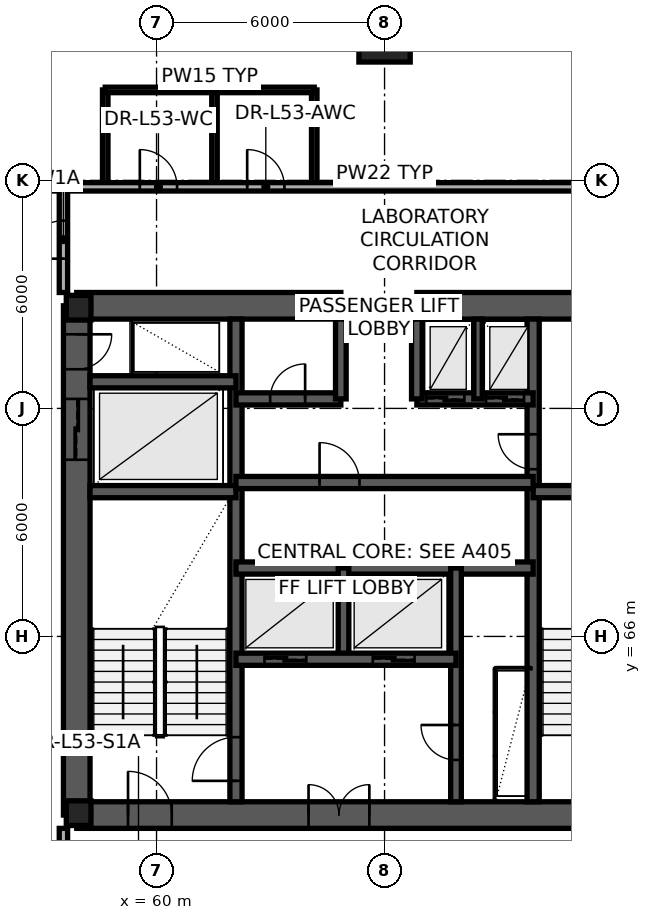
"""IFC4 building model, lengths in metres.
Left out: names, types, materials, properties, quantities, classifications, styles, units other than length and angle.
Written with IfcOpenShell. Run it as: python <this file> out.ifc"""

import sys

from ifc_helpers import new_model, si_unit, direction, frame, frame_2d, origin, origin_2d, place, context, subcontext, project, spatial, rectangle, extrude, element, fill, save


model = new_model("IFC4")
c1 = context("Model", 3, precision=1e-05, world=origin(), true_north=direction((0.0, 1.0)))
c2 = subcontext(c1, "Body", "Model", "MODEL_VIEW")
j1 = project(units=[si_unit("LENGTHUNIT", "METRE"), si_unit("PLANEANGLEUNIT", "RADIAN")], contexts=[c1])
p1 = place(None, origin())
s1 = spatial("IfcSite", under=j1, at=p1, CompositionType="ELEMENT")
p2 = place(p1, origin())
s2 = spatial("IfcBuilding", under=s1, at=p2, CompositionType="ELEMENT")
p3 = place(p2, frame((0.0, 0.0, 201.3)))
s3 = spatial("IfcBuildingStorey", under=s2, at=p3, CompositionType="ELEMENT", Elevation=201.3)
p4 = place(p3, frame((57.9, 61.3, 0.0), z_axis=(0.0, 0.0, 1.0), x_axis=(1.0, 0.0, 0.0)))
e1 = element("IfcWall", 1, at=p4, inside=s3, PredefinedType="SHEAR", context=c2, shape_type="SweptSolid", body=[
    extrude(rectangle(XDim=16.2, YDim=0.7, at=frame_2d((8.1, 0.0))), origin(), (0.0, 0.0, 1.0), 3.65),
])
p5 = place(p4, frame((1.35, 0.0, 0.0)))
e2 = element("IfcOpeningElement", 2, at=p5, cuts=e1, PredefinedType="OPENING", context=c2, shape_type="SweptSolid", body=[
    extrude(rectangle(XDim=1.15, YDim=2.15, at=frame_2d((0.575, 1.075))), frame((0.0, 0.36, 0.0), z_axis=(0.0, -1.0, 0.0), x_axis=(1.0, 0.0, 0.0)), (0.0, 0.0, 1.0), 0.72),
])
p6 = place(p4, frame((6.1, 0.0, 0.0)))
e3 = element("IfcOpeningElement", 3, at=p6, cuts=e1, PredefinedType="OPENING", context=c2, shape_type="SweptSolid", body=[
    extrude(rectangle(XDim=1.6, YDim=2.15, at=frame_2d((0.8, 1.075))), frame((0.0, 0.36, 0.0), z_axis=(0.0, -1.0, 0.0), x_axis=(1.0, 0.0, 0.0)), (0.0, 0.0, 1.0), 0.72),
])
p7 = place(p4, frame((13.55, 0.0, 0.0)))
e4 = element("IfcOpeningElement", 4, at=p7, cuts=e1, PredefinedType="OPENING", context=c2, shape_type="SweptSolid", body=[
    extrude(rectangle(XDim=1.15, YDim=2.15, at=frame_2d((0.575, 1.075))), frame((0.0, 0.36, 0.0), z_axis=(0.0, -1.0, 0.0), x_axis=(1.0, 0.0, 0.0)), (0.0, 0.0, 1.0), 0.72),
])
p8 = place(p3, frame((74.1, 74.7, 0.0), z_axis=(0.0, 0.0, 1.0), x_axis=(-1.0, 0.0, 0.0)))
e5 = element("IfcWall", 5, at=p8, inside=s3, PredefinedType="SHEAR", context=c2, shape_type="SweptSolid", body=[
    extrude(rectangle(XDim=7.25, YDim=0.7, at=frame_2d((3.625, 0.0))), origin(), (0.0, 0.0, 1.0), 3.65),
])
p9 = place(p3, frame((64.85, 74.7, 0.0), z_axis=(0.0, 0.0, 1.0), x_axis=(-1.0, 0.0, 0.0)))
e6 = element("IfcWall", 6, at=p9, inside=s3, PredefinedType="SHEAR", context=c2, shape_type="SweptSolid", body=[
    extrude(rectangle(XDim=6.95, YDim=0.7, at=frame_2d((3.475, 0.0))), origin(), (0.0, 0.0, 1.0), 3.65),
])
p10 = place(p3, frame((57.9, 74.7, 0.0), z_axis=(0.0, 0.0, 1.0), x_axis=(0.0, -1.0, 0.0)))
e7 = element("IfcWall", 7, at=p10, inside=s3, PredefinedType="SHEAR", context=c2, shape_type="SweptSolid", body=[
    extrude(rectangle(XDim=13.4, YDim=0.7, at=frame_2d((6.7, 0.0))), origin(), (0.0, 0.0, 1.0), 3.65),
])
p11 = place(p10, frame((0.75, 0.0, 0.0)))
e8 = element("IfcOpeningElement", 8, at=p11, cuts=e7, PredefinedType="OPENING", context=c2, shape_type="SweptSolid", body=[
    extrude(rectangle(XDim=0.92, YDim=2.05, at=frame_2d((0.46, 1.025))), frame((0.0, 0.36, 0.0), z_axis=(0.0, -1.0, 0.0), x_axis=(1.0, 0.0, 0.0)), (0.0, 0.0, 1.0), 0.72),
])
p12 = place(p10, frame((2.45, 0.0, 0.0)))
e9 = element("IfcOpeningElement", 9, at=p12, cuts=e7, PredefinedType="OPENING", context=c2, shape_type="SweptSolid", body=[
    extrude(rectangle(XDim=1.6, YDim=2.3, at=frame_2d((0.8, 1.15))), frame((0.0, 0.36, 0.0), z_axis=(0.0, -1.0, 0.0), x_axis=(1.0, 0.0, 0.0)), (0.0, 0.0, 1.0), 0.72),
])
p13 = place(p3, frame((62.09, 61.65, 0.0), z_axis=(0.0, 0.0, 1.0), x_axis=(0.0, 1.0, 0.0)))
e10 = element("IfcWall", 10, at=p13, inside=s3, PredefinedType="SHEAR", context=c2, shape_type="SweptSolid", body=[
    extrude(rectangle(XDim=12.7, YDim=0.32, at=frame_2d((6.35, 0.0))), origin(), (0.0, 0.0, 1.0), 3.65),
])
p14 = place(p13, frame((0.55, 0.0, 0.0)))
e11 = element("IfcOpeningElement", 11, at=p14, cuts=e10, PredefinedType="OPENING", context=c2, shape_type="SweptSolid", body=[
    extrude(rectangle(XDim=1.15, YDim=2.15, at=frame_2d((0.575, 1.075))), frame((0.0, 0.17, 0.0), z_axis=(0.0, -1.0, 0.0), x_axis=(1.0, 0.0, 0.0)), (0.0, 0.0, 1.0), 0.34),
])
p15 = place(p3, frame((69.91, 61.65, 0.0), z_axis=(0.0, 0.0, 1.0), x_axis=(0.0, 1.0, 0.0)))
e12 = element("IfcWall", 12, at=p15, inside=s3, PredefinedType="SHEAR", context=c2, shape_type="SweptSolid", body=[
    extrude(rectangle(XDim=12.7, YDim=0.32, at=frame_2d((6.35, 0.0))), origin(), (0.0, 0.0, 1.0), 3.65),
])
p16 = place(p15, frame((8.75, 0.0, 0.0)))
e13 = element("IfcOpeningElement", 13, at=p16, cuts=e12, PredefinedType="OPENING", context=c2, shape_type="SweptSolid", body=[
    extrude(rectangle(XDim=0.92, YDim=2.05, at=frame_2d((0.46, 1.025))), frame((0.0, 0.17, 0.0), z_axis=(0.0, -1.0, 0.0), x_axis=(1.0, 0.0, 0.0)), (0.0, 0.0, 1.0), 0.34),
])
for number, where, z_axis, x_axis in (
    (14, (58.25, 69.81, 0.0), (0.0, 0.0, 1.0), (1.0, 0.0, 0.0)),
    (15, (69.91, 69.81, 0.0), (0.0, 0.0, 1.0), (1.0, 0.0, 0.0)),
    (16, (58.25, 72.7, 0.0), (0.0, 0.0, 1.0), (1.0, 0.0, 0.0)),
):
    element("IfcWall", number, at=place(p3, frame(where, z_axis=z_axis, x_axis=x_axis)), inside=s3, PredefinedType="SHEAR", context=c2, shape_type="SweptSolid", body=[
        extrude(rectangle(XDim=3.84, YDim=0.32, at=frame_2d((1.92, 0.0))), origin(), (0.0, 0.0, 1.0), 3.65),
    ])
p17 = place(p3, frame((62.09, 67.8, 0.0), z_axis=(0.0, 0.0, 1.0), x_axis=(1.0, 0.0, 0.0)))
e17 = element("IfcWall", 17, at=p17, inside=s3, PredefinedType="SHEAR", context=c2, shape_type="SweptSolid", body=[
    extrude(rectangle(XDim=7.82, YDim=0.32, at=frame_2d((3.91, 0.0))), origin(), (0.0, 0.0, 1.0), 3.65),
])
p18 = place(p3, frame((64.92, 65.4, 0.0), z_axis=(0.0, 0.0, 1.0), x_axis=(0.0, 1.0, 0.0)))
e18 = element("IfcWall", 18, at=p18, inside=s3, PredefinedType="SHEAR", context=c2, shape_type="SweptSolid", body=[
    extrude(rectangle(XDim=2.4, YDim=0.28, at=frame_2d((1.2, 0.0))), origin(), (0.0, 0.0, 1.0), 3.65),
])
p19 = place(p3, frame((62.09, 70.05, 0.0), z_axis=(0.0, 0.0, 1.0), x_axis=(1.0, 0.0, 0.0)))
e19 = element("IfcWall", 19, at=p19, inside=s3, PredefinedType="SHEAR", context=c2, shape_type="SweptSolid", body=[
    extrude(rectangle(XDim=7.82, YDim=0.32, at=frame_2d((3.91, 0.0))), origin(), (0.0, 0.0, 1.0), 3.65),
])
p20 = place(p19, frame((2.2, 0.0, 0.0)))
e20 = element("IfcOpeningElement", 20, at=p20, cuts=e19, PredefinedType="OPENING", context=c2, shape_type="SweptSolid", body=[
    extrude(rectangle(XDim=1.05, YDim=2.15, at=frame_2d((0.525, 1.075))), frame((0.0, 0.17, 0.0), z_axis=(0.0, -1.0, 0.0), x_axis=(1.0, 0.0, 0.0)), (0.0, 0.0, 1.0), 0.34),
])
p21 = place(p3, frame((62.09, 72.25, 0.0), z_axis=(0.0, 0.0, 1.0), x_axis=(1.0, 0.0, 0.0)))
e21 = element("IfcWall", 21, at=p21, inside=s3, PredefinedType="SHEAR", context=c2, shape_type="SweptSolid", body=[
    extrude(rectangle(XDim=2.76, YDim=0.32, at=frame_2d((1.38, 0.0))), origin(), (0.0, 0.0, 1.0), 3.65),
])
p22 = place(p21, frame((0.9, 0.0, 0.0)))
e22 = element("IfcOpeningElement", 22, at=p22, cuts=e21, PredefinedType="OPENING", context=c2, shape_type="SweptSolid", body=[
    extrude(rectangle(XDim=0.92, YDim=2.05, at=frame_2d((0.46, 1.025))), frame((0.0, 0.17, 0.0), z_axis=(0.0, -1.0, 0.0), x_axis=(1.0, 0.0, 0.0)), (0.0, 0.0, 1.0), 0.34),
])
p23 = place(p3, frame((66.85, 72.25, 0.0), z_axis=(0.0, 0.0, 1.0), x_axis=(1.0, 0.0, 0.0)))
e23 = element("IfcWall", 23, at=p23, inside=s3, PredefinedType="SHEAR", context=c2, shape_type="SweptSolid", body=[
    extrude(rectangle(XDim=3.06, YDim=0.32, at=frame_2d((1.53, 0.0))), origin(), (0.0, 0.0, 1.0), 3.65),
])
p24 = place(p23, frame((0.25, 0.0, 0.0)))
e24 = element("IfcOpeningElement", 24, at=p24, cuts=e23, PredefinedType="OPENING", context=c2, shape_type="SweptSolid", body=[
    extrude(rectangle(XDim=1.0, YDim=2.2, at=frame_2d((0.5, 1.1))), frame((0.0, 0.17, 0.0), z_axis=(0.0, -1.0, 0.0), x_axis=(1.0, 0.0, 0.0)), (0.0, 0.0, 1.0), 0.34),
])
p25 = place(p23, frame((1.82, 0.0, 0.0)))
e25 = element("IfcOpeningElement", 25, at=p25, cuts=e23, PredefinedType="OPENING", context=c2, shape_type="SweptSolid", body=[
    extrude(rectangle(XDim=1.0, YDim=2.2, at=frame_2d((0.5, 1.1))), frame((0.0, 0.17, 0.0), z_axis=(0.0, -1.0, 0.0), x_axis=(1.0, 0.0, 0.0)), (0.0, 0.0, 1.0), 0.34),
])
for number, where, z_axis, x_axis in (
    (26, (64.85, 72.25, 0.0), (0.0, 0.0, 1.0), (0.0, 1.0, 0.0)),
    (27, (66.85, 72.25, 0.0), (0.0, 0.0, 1.0), (0.0, 1.0, 0.0)),
):
    element("IfcWall", number, at=place(p3, frame(where, z_axis=z_axis, x_axis=x_axis)), inside=s3, PredefinedType="SHEAR", context=c2, shape_type="SweptSolid", body=[
        extrude(rectangle(XDim=2.1, YDim=0.28, at=frame_2d((1.05, 0.0))), origin(), (0.0, 0.0, 1.0), 3.65),
    ])
p26 = place(p3, frame((68.46, 72.25, 0.0), z_axis=(0.0, 0.0, 1.0), x_axis=(0.0, 1.0, 0.0)))
e28 = element("IfcWall", 28, at=p26, inside=s3, PredefinedType="SHEAR", context=c2, shape_type="SweptSolid", body=[
    extrude(rectangle(XDim=2.1, YDim=0.22, at=frame_2d((1.05, 0.0))), origin(), (0.0, 0.0, 1.0), 3.65),
])
p27 = place(p3, frame((67.88, 61.65, 0.0), z_axis=(0.0, 0.0, 1.0), x_axis=(0.0, 1.0, 0.0)))
e29 = element("IfcWall", 29, at=p27, inside=s3, PredefinedType="SHEAR", context=c2, shape_type="SweptSolid", body=[
    extrude(rectangle(XDim=6.15, YDim=0.28, at=frame_2d((3.075, 0.0))), origin(), (0.0, 0.0, 1.0), 3.65),
])
p28 = place(p27, frame((1.1, 0.0, 0.0)))
e30 = element("IfcOpeningElement", 30, at=p28, cuts=e29, PredefinedType="OPENING", context=c2, shape_type="SweptSolid", body=[
    extrude(rectangle(XDim=0.92, YDim=2.05, at=frame_2d((0.46, 1.025))), frame((0.0, 0.15, 0.0), z_axis=(0.0, -1.0, 0.0), x_axis=(1.0, 0.0, 0.0)), (0.0, 0.0, 1.0), 0.3),
])
p29 = place(p3, frame((62.09, 65.4, 0.0), z_axis=(0.0, 0.0, 1.0), x_axis=(1.0, 0.0, 0.0)))
e31 = element("IfcWall", 31, at=p29, inside=s3, PredefinedType="SHEAR", context=c2, shape_type="SweptSolid", body=[
    extrude(rectangle(XDim=5.79, YDim=0.32, at=frame_2d((2.895, 0.0))), origin(), (0.0, 0.0, 1.0), 3.65),
])
p30 = place(p29, frame((0.75, 0.0, 0.0)))
e32 = element("IfcOpeningElement", 32, at=p30, cuts=e31, PredefinedType="OPENING", context=c2, shape_type="SweptSolid", body=[
    extrude(rectangle(XDim=1.1, YDim=2.2, at=frame_2d((0.55, 1.1))), frame((0.0, 0.17, 0.0), z_axis=(0.0, -1.0, 0.0), x_axis=(1.0, 0.0, 0.0)), (0.0, 0.0, 1.0), 0.34),
])
p31 = place(p29, frame((3.6, 0.0, 0.0)))
e33 = element("IfcOpeningElement", 33, at=p31, cuts=e31, PredefinedType="OPENING", context=c2, shape_type="SweptSolid", body=[
    extrude(rectangle(XDim=1.1, YDim=2.2, at=frame_2d((0.55, 1.1))), frame((0.0, 0.17, 0.0), z_axis=(0.0, -1.0, 0.0), x_axis=(1.0, 0.0, 0.0)), (0.0, 0.0, 1.0), 0.34),
])
for number, where, z_axis, x_axis in (
    (34, (57.95, 61.35, 0.0), (0.0, 0.0, 1.0), (1.0, 0.0, 0.0)),
    (35, (57.95, 74.65, 0.0), (0.0, 0.0, 1.0), (1.0, 0.0, 0.0)),
):
    element("IfcColumn", number, at=place(p3, frame(where, z_axis=z_axis, x_axis=x_axis)), inside=s3, PredefinedType="COLUMN", context=c2, shape_type="SweptSolid", body=[
        extrude(rectangle(XDim=0.65, YDim=0.65, at=origin_2d()), origin(), (0.0, 0.0, 1.0), 3.65),
    ])
p32 = place(p3, frame((66.0, 81.789, 0.0), z_axis=(0.0, 0.0, 1.0), x_axis=(1.0, 0.0, 0.0)))
e36 = element("IfcColumn", 36, at=p32, inside=s3, PredefinedType="COLUMN", context=c2, shape_type="SweptSolid", body=[
    extrude(rectangle(XDim=1.35, YDim=1.35, at=origin_2d()), origin(), (0.0, 0.0, 1.0), 3.65),
])
p33 = place(p3, frame((61.231, 32.098, 0.0), z_axis=(0.0, 0.0, 1.0), x_axis=(-0.398627130257, 0.917113085188, 0.0)))
e37 = element("IfcWall", 37, at=p33, inside=s3, PredefinedType="STANDARD", context=c2, shape_type="SweptSolid", body=[
    extrude(rectangle(XDim=51.591, YDim=0.34, at=frame_2d((25.795, 0.0))), origin(), (0.0, 0.0, 1.0), 0.85),
])
p34 = place(p3, frame((58.65, 77.83, 0.0), z_axis=(0.0, 0.0, 1.0), x_axis=(0.0, 1.0, 0.0)))
e38 = element("IfcWall", 38, at=p34, inside=s3, PredefinedType="PARTITIONING", context=c2, shape_type="SweptSolid", body=[
    extrude(rectangle(XDim=2.55, YDim=0.145, at=frame_2d((1.275, 0.0))), origin(), (0.0, 0.0, 1.0), 2.78),
])
for number, where, z_axis, x_axis in (
    (39, (61.525, 77.83, 0.0), (0.0, 0.0, 1.0), (0.0, 1.0, 0.0)),
    (40, (64.15, 77.83, 0.0), (0.0, 0.0, 1.0), (0.0, 1.0, 0.0)),
):
    element("IfcWall", number, at=place(p3, frame(where, z_axis=z_axis, x_axis=x_axis)), inside=s3, PredefinedType="PARTITIONING", context=c2, shape_type="SweptSolid", body=[
        extrude(rectangle(XDim=2.55, YDim=0.145, at=frame_2d((1.275, 0.0))), origin(), (0.0, 0.0, 1.0), 3.4),
    ])
p35 = place(p3, frame((58.65, 80.38, 0.0), z_axis=(0.0, 0.0, 1.0), x_axis=(1.0, 0.0, 0.0)))
e41 = element("IfcWall", 41, at=p35, inside=s3, PredefinedType="PARTITIONING", context=c2, shape_type="SweptSolid", body=[
    extrude(rectangle(XDim=5.5, YDim=0.145, at=frame_2d((2.75, 0.0))), origin(), (0.0, 0.0, 1.0), 2.78),
])
p36 = place(p3, frame((41.446, 77.83, 0.0), z_axis=(0.0, 0.0, 1.0), x_axis=(1.0, 0.0, 0.0)))
e42 = element("IfcWall", 42, at=p36, inside=s3, PredefinedType="PARTITIONING", context=c2, shape_type="SweptSolid", body=[
    extrude(rectangle(XDim=49.108, YDim=0.22, at=frame_2d((24.554, 0.0))), origin(), (0.0, 0.0, 1.0), 2.6),
])
p37 = place(p36, frame((18.114, 0.0, 0.0)))
e43 = element("IfcOpeningElement", 43, at=p37, cuts=e42, PredefinedType="OPENING", context=c2, shape_type="SweptSolid", body=[
    extrude(rectangle(XDim=0.98, YDim=2.1, at=frame_2d((0.49, 1.05))), frame((0.0, 0.12, 0.0), z_axis=(0.0, -1.0, 0.0), x_axis=(1.0, 0.0, 0.0)), (0.0, 0.0, 1.0), 0.24),
])
p38 = place(p36, frame((20.939, 0.0, 0.0)))
e44 = element("IfcOpeningElement", 44, at=p38, cuts=e42, PredefinedType="OPENING", context=c2, shape_type="SweptSolid", body=[
    extrude(rectangle(XDim=0.98, YDim=2.1, at=frame_2d((0.49, 1.05))), frame((0.0, 0.12, 0.0), z_axis=(0.0, -1.0, 0.0), x_axis=(1.0, 0.0, 0.0)), (0.0, 0.0, 1.0), 0.24),
])
p39 = place(p36, frame((31.676, 0.0, 0.0)))
e45 = element("IfcOpeningElement", 45, at=p39, cuts=e42, PredefinedType="OPENING", context=c2, shape_type="SweptSolid", body=[
    extrude(rectangle(XDim=1.0, YDim=2.1, at=frame_2d((0.5, 1.05))), frame((0.0, 0.12, 0.0), z_axis=(0.0, -1.0, 0.0), x_axis=(1.0, 0.0, 0.0)), (0.0, 0.0, 1.0), 0.24),
])
p40 = place(p3, frame((57.55, 75.05, 0.0), z_axis=(0.0, 0.0, 1.0), x_axis=(0.0, 1.0, 0.0)))
e46 = element("IfcWall", 46, at=p40, inside=s3, PredefinedType="PARTITIONING", context=c2, shape_type="SweptSolid", body=[
    extrude(rectangle(XDim=2.78, YDim=0.22, at=frame_2d((1.39, 0.0))), origin(), (0.0, 0.0, 1.0), 2.78),
])
p41 = place(p40, frame((0.89, 0.0, 0.0)))
e47 = element("IfcOpeningElement", 47, at=p41, cuts=e46, PredefinedType="OPENING", context=c2, shape_type="SweptSolid", body=[
    extrude(rectangle(XDim=1.0, YDim=2.1, at=frame_2d((0.5, 1.05))), frame((0.0, 0.12, 0.0), z_axis=(0.0, -1.0, 0.0), x_axis=(1.0, 0.0, 0.0)), (0.0, 0.0, 1.0), 0.24),
])
p42 = place(p3, frame((57.55, 59.53, 0.0), z_axis=(0.0, 0.0, 1.0), x_axis=(0.0, 1.0, 0.0)))
e48 = element("IfcWall", 48, at=p42, inside=s3, PredefinedType="PARTITIONING", context=c2, shape_type="SweptSolid", body=[
    extrude(rectangle(XDim=1.42, YDim=0.22, at=frame_2d((0.71, 0.0))), origin(), (0.0, 0.0, 1.0), 2.78),
])
p43 = place(p14, origin())
e49 = element("IfcDoor", 49, at=p43, inside=s3, OperationType="SINGLE_SWING_LEFT", PredefinedType="DOOR", context=c2, shape_type="SweptSolid", body=[
    extrude(rectangle(XDim=1.15, YDim=2.15, at=frame_2d((0.575, 1.075))), frame((0.0, 0.025, 0.0), z_axis=(0.0, -1.0, 0.0), x_axis=(1.0, 0.0, 0.0)), (0.0, 0.0, 1.0), 0.05),
])
fill(e11, e49)
p44 = place(p28, origin())
e50 = element("IfcDoor", 50, at=p44, inside=s3, OperationType="SINGLE_SWING_RIGHT", PredefinedType="DOOR", context=c2, shape_type="SweptSolid", body=[
    extrude(rectangle(XDim=0.92, YDim=2.05, at=frame_2d((0.46, 1.025))), frame((0.0, 0.025, 0.0), z_axis=(0.0, -1.0, 0.0), x_axis=(1.0, 0.0, 0.0)), (0.0, 0.0, 1.0), 0.05),
])
fill(e30, e50)
p45 = place(p30, origin())
e51 = element("IfcDoor", 51, at=p45, inside=s3, OperationType="SLIDING_TO_LEFT", PredefinedType="DOOR", context=c2, shape_type="SweptSolid", body=[
    extrude(rectangle(XDim=1.1, YDim=2.2, at=frame_2d((0.55, 1.1))), frame((0.0, 0.025, 0.0), z_axis=(0.0, -1.0, 0.0), x_axis=(1.0, 0.0, 0.0)), (0.0, 0.0, 1.0), 0.05),
])
fill(e32, e51)
p46 = place(p31, origin())
e52 = element("IfcDoor", 52, at=p46, inside=s3, OperationType="SLIDING_TO_LEFT", PredefinedType="DOOR", context=c2, shape_type="SweptSolid", body=[
    extrude(rectangle(XDim=1.1, YDim=2.2, at=frame_2d((0.55, 1.1))), frame((0.0, 0.025, 0.0), z_axis=(0.0, -1.0, 0.0), x_axis=(1.0, 0.0, 0.0)), (0.0, 0.0, 1.0), 0.05),
])
fill(e33, e52)
p47 = place(p20, origin())
e53 = element("IfcDoor", 53, at=p47, inside=s3, OperationType="SINGLE_SWING_LEFT", PredefinedType="DOOR", context=c2, shape_type="SweptSolid", body=[
    extrude(rectangle(XDim=1.05, YDim=2.15, at=frame_2d((0.525, 1.075))), frame((0.0, 0.025, 0.0), z_axis=(0.0, -1.0, 0.0), x_axis=(1.0, 0.0, 0.0)), (0.0, 0.0, 1.0), 0.05),
])
fill(e20, e53)
p48 = place(p22, origin())
e54 = element("IfcDoor", 54, at=p48, inside=s3, OperationType="SINGLE_SWING_RIGHT", PredefinedType="DOOR", context=c2, shape_type="SweptSolid", body=[
    extrude(rectangle(XDim=0.92, YDim=2.05, at=frame_2d((0.46, 1.025))), frame((0.0, 0.025, 0.0), z_axis=(0.0, -1.0, 0.0), x_axis=(1.0, 0.0, 0.0)), (0.0, 0.0, 1.0), 0.05),
])
fill(e22, e54)
p49 = place(p24, origin())
e55 = element("IfcDoor", 55, at=p49, inside=s3, OperationType="SLIDING_TO_LEFT", PredefinedType="DOOR", context=c2, shape_type="SweptSolid", body=[
    extrude(rectangle(XDim=1.0, YDim=2.2, at=frame_2d((0.5, 1.1))), frame((0.0, 0.025, 0.0), z_axis=(0.0, -1.0, 0.0), x_axis=(1.0, 0.0, 0.0)), (0.0, 0.0, 1.0), 0.05),
])
fill(e24, e55)
p50 = place(p25, origin())
e56 = element("IfcDoor", 56, at=p50, inside=s3, OperationType="SLIDING_TO_LEFT", PredefinedType="DOOR", context=c2, shape_type="SweptSolid", body=[
    extrude(rectangle(XDim=1.0, YDim=2.2, at=frame_2d((0.5, 1.1))), frame((0.0, 0.025, 0.0), z_axis=(0.0, -1.0, 0.0), x_axis=(1.0, 0.0, 0.0)), (0.0, 0.0, 1.0), 0.05),
])
fill(e25, e56)
p51 = place(p5, origin())
e57 = element("IfcDoor", 57, at=p51, inside=s3, OperationType="SINGLE_SWING_LEFT", PredefinedType="DOOR", context=c2, shape_type="SweptSolid", body=[
    extrude(rectangle(XDim=1.15, YDim=2.15, at=frame_2d((0.575, 1.075))), frame((0.0, 0.025, 0.0), z_axis=(0.0, -1.0, 0.0), x_axis=(1.0, 0.0, 0.0)), (0.0, 0.0, 1.0), 0.05),
])
fill(e2, e57)
p52 = place(p6, origin())
e58 = element("IfcDoor", 58, at=p52, inside=s3, OperationType="DOUBLE_DOOR_SINGLE_SWING", PredefinedType="DOOR", context=c2, shape_type="SweptSolid", body=[
    extrude(rectangle(XDim=1.6, YDim=2.15, at=frame_2d((0.8, 1.075))), frame((0.0, 0.025, 0.0), z_axis=(0.0, -1.0, 0.0), x_axis=(1.0, 0.0, 0.0)), (0.0, 0.0, 1.0), 0.05),
])
fill(e3, e58)
p53 = place(p11, origin())
e59 = element("IfcDoor", 59, at=p53, inside=s3, OperationType="SINGLE_SWING_LEFT", PredefinedType="DOOR", context=c2, shape_type="SweptSolid", body=[
    extrude(rectangle(XDim=0.92, YDim=2.05, at=frame_2d((0.46, 1.025))), frame((0.0, 0.025, 0.0), z_axis=(0.0, -1.0, 0.0), x_axis=(1.0, 0.0, 0.0)), (0.0, 0.0, 1.0), 0.05),
])
fill(e8, e59)
p54 = place(p12, origin())
e60 = element("IfcDoor", 60, at=p54, inside=s3, OperationType="DOUBLE_DOOR_SLIDING", PredefinedType="DOOR", context=c2, shape_type="SweptSolid", body=[
    extrude(rectangle(XDim=1.6, YDim=2.3, at=frame_2d((0.8, 1.15))), frame((0.0, 0.025, 0.0), z_axis=(0.0, -1.0, 0.0), x_axis=(1.0, 0.0, 0.0)), (0.0, 0.0, 1.0), 0.05),
])
fill(e9, e60)
p55 = place(p16, origin())
e61 = element("IfcDoor", 61, at=p55, inside=s3, OperationType="SINGLE_SWING_RIGHT", PredefinedType="DOOR", context=c2, shape_type="SweptSolid", body=[
    extrude(rectangle(XDim=0.92, YDim=2.05, at=frame_2d((0.46, 1.025))), frame((0.0, 0.025, 0.0), z_axis=(0.0, -1.0, 0.0), x_axis=(1.0, 0.0, 0.0)), (0.0, 0.0, 1.0), 0.05),
])
fill(e13, e61)
p56 = place(p37, origin())
e62 = element("IfcDoor", 62, at=p56, inside=s3, OperationType="SINGLE_SWING_LEFT", PredefinedType="DOOR", context=c2, shape_type="SweptSolid", body=[
    extrude(rectangle(XDim=0.98, YDim=2.1, at=frame_2d((0.49, 1.05))), frame((0.0, 0.025, 0.0), z_axis=(0.0, -1.0, 0.0), x_axis=(1.0, 0.0, 0.0)), (0.0, 0.0, 1.0), 0.05),
])
fill(e43, e62)
p57 = place(p38, origin())
e63 = element("IfcDoor", 63, at=p57, inside=s3, OperationType="SINGLE_SWING_LEFT", PredefinedType="DOOR", context=c2, shape_type="SweptSolid", body=[
    extrude(rectangle(XDim=0.98, YDim=2.1, at=frame_2d((0.49, 1.05))), frame((0.0, 0.025, 0.0), z_axis=(0.0, -1.0, 0.0), x_axis=(1.0, 0.0, 0.0)), (0.0, 0.0, 1.0), 0.05),
])
fill(e44, e63)
p58 = place(p41, origin())
e64 = element("IfcDoor", 64, at=p58, inside=s3, OperationType="SINGLE_SWING_LEFT", PredefinedType="DOOR", context=c2, shape_type="SweptSolid", body=[
    extrude(rectangle(XDim=1.0, YDim=2.1, at=frame_2d((0.5, 1.05))), frame((0.0, 0.025, 0.0), z_axis=(0.0, -1.0, 0.0), x_axis=(1.0, 0.0, 0.0)), (0.0, 0.0, 1.0), 0.05),
])
fill(e47, e64)
save(model, sys.argv[1])
